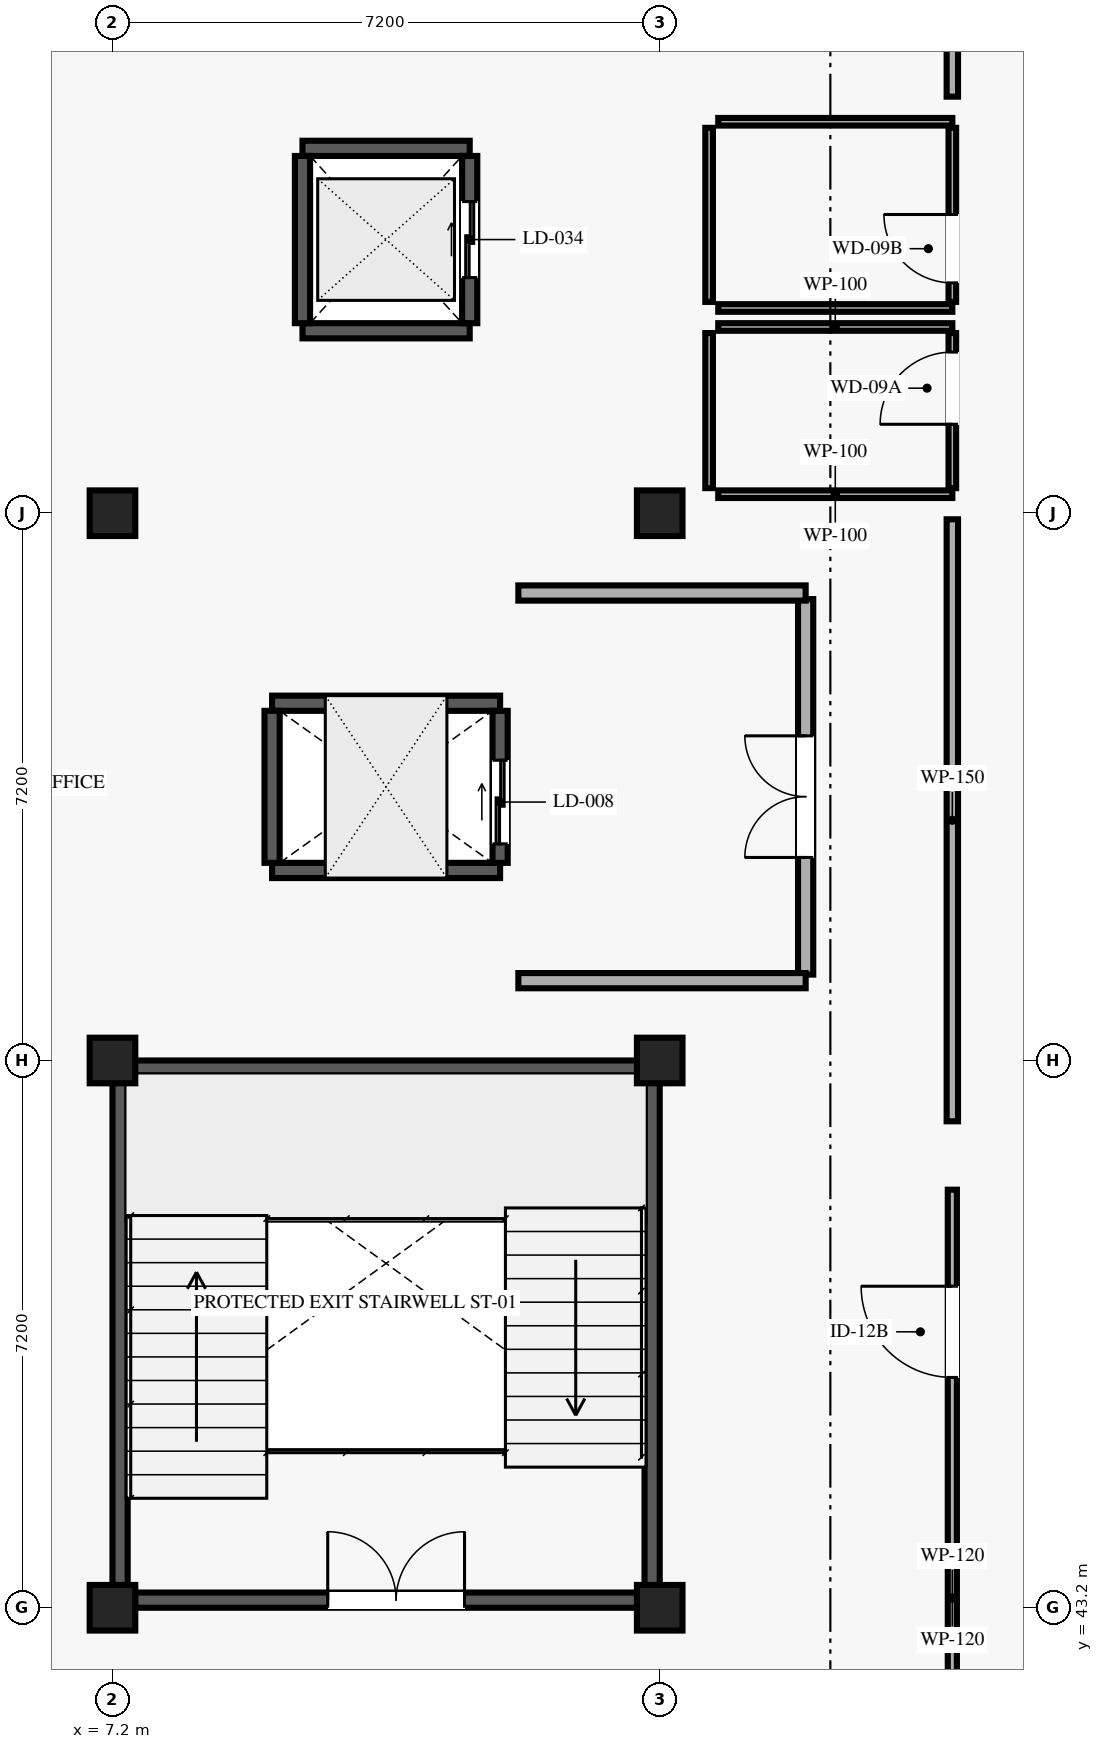
"""IFC4 building model, lengths in metres.
Left out: names, types, materials, properties, quantities, classifications, styles, units other than length and angle.
Written with IfcOpenShell. Run it as: python <this file> out.ifc"""

import sys

from ifc_helpers import new_model, si_unit, direction, frame, frame_2d, origin, origin_2d, place, context, subcontext, project, spatial, rectangle, extrude, element, fill, save


model = new_model("IFC4")
c1 = context("Model", 3, precision=1e-05, world=origin(), true_north=direction((0.0, 1.0)))
c2 = subcontext(c1, "Body", "Model", "MODEL_VIEW")
j1 = project(units=[si_unit("LENGTHUNIT", "METRE"), si_unit("PLANEANGLEUNIT", "RADIAN")], contexts=[c1])
p1 = place(None, origin())
s1 = spatial("IfcSite", under=j1, at=p1, CompositionType="ELEMENT")
p2 = place(p1, origin())
s2 = spatial("IfcBuilding", under=s1, at=p2, CompositionType="ELEMENT")
p3 = place(p2, frame((0.0, 0.0, 25.65)))
s3 = spatial("IfcBuildingStorey", under=s2, at=p3, CompositionType="ELEMENT", Elevation=25.65)
for number, where, z_axis, x_axis in (
    (1, (7.2, 43.2, 0.0), (0.0, 0.0, 1.0), (1.0, 0.0, 0.0)),
    (2, (7.2, 50.4, 0.0), (0.0, 0.0, 1.0), (1.0, 0.0, 0.0)),
    (3, (7.2, 57.6, 0.0), (0.0, 0.0, 1.0), (1.0, 0.0, 0.0)),
    (4, (14.4, 43.2, 0.0), (0.0, 0.0, 1.0), (1.0, 0.0, 0.0)),
    (5, (14.4, 50.4, 0.0), (0.0, 0.0, 1.0), (1.0, 0.0, 0.0)),
    (6, (14.4, 57.6, 0.0), (0.0, 0.0, 1.0), (1.0, 0.0, 0.0)),
):
    element("IfcColumn", number, at=place(p3, frame(where, z_axis=z_axis, x_axis=x_axis)), inside=s3, PredefinedType="COLUMN", context=c2, shape_type="SweptSolid", body=[
        extrude(rectangle(XDim=0.6, YDim=0.6, at=origin_2d()), origin(), (0.0, 0.0, 1.0), 4.05),
    ])
p4 = place(p3, frame((7.4, 43.3, 0.0), z_axis=(0.0, 0.0, 1.0), x_axis=(1.0, 0.0, 0.0)))
e7 = element("IfcWall", 7, at=p4, inside=s3, PredefinedType="SHEAR", context=c2, shape_type="SweptSolid", body=[
    extrude(rectangle(XDim=6.8, YDim=0.2, at=frame_2d((3.4, 0.0))), origin(), (0.0, 0.0, 1.0), 3.83),
])
p5 = place(p4, frame((2.632, 0.0, 0.0)))
e8 = element("IfcOpeningElement", 8, at=p5, cuts=e7, PredefinedType="OPENING", context=c2, shape_type="SweptSolid", body=[
    extrude(rectangle(XDim=1.8, YDim=2.2, at=frame_2d((0.9, 1.1))), frame((0.0, 0.11, 0.0), z_axis=(0.0, -1.0, 0.0), x_axis=(1.0, 0.0, 0.0)), (0.0, 0.0, 1.0), 0.22),
])
for number, where, z_axis, x_axis in (
    (9, (7.4, 50.3, 0.0), (0.0, 0.0, 1.0), (1.0, 0.0, 0.0)),
    (10, (7.3, 43.4, 0.0), (0.0, 0.0, 1.0), (0.0, 1.0, 0.0)),
    (11, (14.3, 43.4, 0.0), (0.0, 0.0, 1.0), (0.0, 1.0, 0.0)),
):
    element("IfcWall", number, at=place(p3, frame(where, z_axis=z_axis, x_axis=x_axis)), inside=s3, PredefinedType="SHEAR", context=c2, shape_type="SweptSolid", body=[
        extrude(rectangle(XDim=6.8, YDim=0.2, at=frame_2d((3.4, 0.0))), origin(), (0.0, 0.0, 1.0), 3.83),
    ])
for number, where, z_axis, x_axis in (
    (12, (9.3, 52.9, 0.0), (0.0, 0.0, 1.0), (1.0, 0.0, 0.0)),
    (13, (9.3, 55.1, 0.0), (0.0, 0.0, 1.0), (1.0, 0.0, 0.0)),
):
    element("IfcWall", number, at=place(p3, frame(where, z_axis=z_axis, x_axis=x_axis)), inside=s3, PredefinedType="SHEAR", context=c2, shape_type="SweptSolid", body=[
        extrude(rectangle(XDim=3.0, YDim=0.2, at=frame_2d((1.5, 0.0))), origin(), (0.0, 0.0, 1.0), 3.83),
    ])
p6 = place(p3, frame((9.3, 53.0, 0.0), z_axis=(0.0, 0.0, 1.0), x_axis=(0.0, 1.0, 0.0)))
e14 = element("IfcWall", 14, at=p6, inside=s3, PredefinedType="SHEAR", context=c2, shape_type="SweptSolid", body=[
    extrude(rectangle(XDim=2.0, YDim=0.2, at=frame_2d((1.0, 0.0))), origin(), (0.0, 0.0, 1.0), 3.83),
])
p7 = place(p3, frame((12.3, 53.0, 0.0), z_axis=(0.0, 0.0, 1.0), x_axis=(0.0, 1.0, 0.0)))
e15 = element("IfcWall", 15, at=p7, inside=s3, PredefinedType="SHEAR", context=c2, shape_type="SweptSolid", body=[
    extrude(rectangle(XDim=2.0, YDim=0.2, at=frame_2d((1.0, 0.0))), origin(), (0.0, 0.0, 1.0), 3.83),
])
p8 = place(p7, frame((0.25, 0.0, 0.0)))
e16 = element("IfcOpeningElement", 16, at=p8, cuts=e15, PredefinedType="OPENING", context=c2, shape_type="SweptSolid", body=[
    extrude(rectangle(XDim=1.1, YDim=2.15, at=frame_2d((0.55, 1.075))), frame((0.0, 0.11, 0.0), z_axis=(0.0, -1.0, 0.0), x_axis=(1.0, 0.0, 0.0)), (0.0, 0.0, 1.0), 0.22),
])
for number, where, z_axis, x_axis in (
    (17, (9.7, 60.0, 0.0), (0.0, 0.0, 1.0), (1.0, 0.0, 0.0)),
    (18, (9.7, 62.4, 0.0), (0.0, 0.0, 1.0), (1.0, 0.0, 0.0)),
    (19, (9.7, 60.1, 0.0), (0.0, 0.0, 1.0), (0.0, 1.0, 0.0)),
):
    element("IfcWall", number, at=place(p3, frame(where, z_axis=z_axis, x_axis=x_axis)), inside=s3, PredefinedType="SHEAR", context=c2, shape_type="SweptSolid", body=[
        extrude(rectangle(XDim=2.2, YDim=0.2, at=frame_2d((1.1, 0.0))), origin(), (0.0, 0.0, 1.0), 3.83),
    ])
p9 = place(p3, frame((11.9, 60.1, 0.0), z_axis=(0.0, 0.0, 1.0), x_axis=(0.0, 1.0, 0.0)))
e20 = element("IfcWall", 20, at=p9, inside=s3, PredefinedType="SHEAR", context=c2, shape_type="SweptSolid", body=[
    extrude(rectangle(XDim=2.2, YDim=0.2, at=frame_2d((1.1, 0.0))), origin(), (0.0, 0.0, 1.0), 3.83),
])
p10 = place(p9, frame((0.6, 0.0, 0.0)))
e21 = element("IfcOpeningElement", 21, at=p10, cuts=e20, PredefinedType="OPENING", context=c2, shape_type="SweptSolid", body=[
    extrude(rectangle(XDim=1.0, YDim=2.1, at=frame_2d((0.5, 1.05))), frame((0.0, 0.11, 0.0), z_axis=(0.0, -1.0, 0.0), x_axis=(1.0, 0.0, 0.0)), (0.0, 0.0, 1.0), 0.22),
])
p11 = place(p3, frame((16.32, 51.53, 0.0), z_axis=(0.0, 0.0, 1.0), x_axis=(0.0, 1.0, 0.0)))
e22 = element("IfcWall", 22, at=p11, inside=s3, PredefinedType="SOLIDWALL", context=c2, shape_type="SweptSolid", body=[
    extrude(rectangle(XDim=4.94, YDim=0.2, at=frame_2d((2.47, 0.0))), origin(), (0.0, 0.0, 1.0), 3.83),
])
p12 = place(p11, frame((1.541, 0.0, 0.0)))
e23 = element("IfcOpeningElement", 23, at=p12, cuts=e22, PredefinedType="OPENING", context=c2, shape_type="SweptSolid", body=[
    extrude(rectangle(XDim=1.6, YDim=2.2, at=frame_2d((0.8, 1.1))), frame((0.0, 0.11, 0.0), z_axis=(0.0, -1.0, 0.0), x_axis=(1.0, 0.0, 0.0)), (0.0, 0.0, 1.0), 0.22),
])
for number, where, z_axis, x_axis in (
    (24, (12.54, 51.45, 0.0), (0.0, 0.0, 1.0), (1.0, 0.0, 0.0)),
    (25, (12.54, 56.55, 0.0), (0.0, 0.0, 1.0), (1.0, 0.0, 0.0)),
):
    element("IfcWall", number, at=place(p3, frame(where, z_axis=z_axis, x_axis=x_axis)), inside=s3, PredefinedType="SOLIDWALL", context=c2, shape_type="SweptSolid", body=[
        extrude(rectangle(XDim=3.78, YDim=0.2, at=frame_2d((1.89, 0.0))), origin(), (0.0, 0.0, 1.0), 3.83),
    ])
p13 = place(p3, frame((18.25, 57.93, 0.0), z_axis=(0.0, 0.0, 1.0), x_axis=(0.0, 1.0, 0.0)))
e26 = element("IfcWall", 26, at=p13, inside=s3, PredefinedType="PARTITIONING", context=c2, shape_type="SweptSolid", body=[
    extrude(rectangle(XDim=2.04, YDim=0.1, at=frame_2d((1.02, 0.0))), origin(), (0.0, 0.0, 1.0), 3.83),
])
p14 = place(p13, frame((0.84, 0.0, 0.0)))
e27 = element("IfcOpeningElement", 27, at=p14, cuts=e26, PredefinedType="OPENING", context=c2, shape_type="SweptSolid", body=[
    extrude(rectangle(XDim=0.95, YDim=2.1, at=frame_2d((0.475, 1.05))), frame((0.0, 0.06, 0.0), z_axis=(0.0, -1.0, 0.0), x_axis=(1.0, 0.0, 0.0)), (0.0, 0.0, 1.0), 0.12),
])
p15 = place(p3, frame((15.17, 57.85, 0.0), z_axis=(0.0, 0.0, 1.0), x_axis=(1.0, 0.0, 0.0)))
e28 = element("IfcWall", 28, at=p15, inside=s3, PredefinedType="PARTITIONING", context=c2, shape_type="SweptSolid", body=[
    extrude(rectangle(XDim=3.08, YDim=0.1, at=frame_2d((1.54, 0.0))), origin(), (0.0, 0.0, 1.0), 3.32),
])
p16 = place(p3, frame((15.17, 60.05, 0.0), z_axis=(0.0, 0.0, 1.0), x_axis=(1.0, 0.0, 0.0)))
e29 = element("IfcWall", 29, at=p16, inside=s3, PredefinedType="PARTITIONING", context=c2, shape_type="SweptSolid", body=[
    extrude(rectangle(XDim=3.08, YDim=0.1, at=frame_2d((1.54, 0.0))), origin(), (0.0, 0.0, 1.0), 3.83),
])
p17 = place(p3, frame((15.05, 57.93, 0.0), z_axis=(0.0, 0.0, 1.0), x_axis=(0.0, 1.0, 0.0)))
e30 = element("IfcWall", 30, at=p17, inside=s3, PredefinedType="PARTITIONING", context=c2, shape_type="SweptSolid", body=[
    extrude(rectangle(XDim=2.04, YDim=0.1, at=frame_2d((1.02, 0.0))), origin(), (0.0, 0.0, 1.0), 3.83),
])
p18 = place(p3, frame((18.25, 60.38, 0.0), z_axis=(0.0, 0.0, 1.0), x_axis=(0.0, 1.0, 0.0)))
e31 = element("IfcWall", 31, at=p18, inside=s3, PredefinedType="PARTITIONING", context=c2, shape_type="SweptSolid", body=[
    extrude(rectangle(XDim=2.29, YDim=0.1, at=frame_2d((1.145, 0.0))), origin(), (0.0, 0.0, 1.0), 3.83),
])
p19 = place(p18, frame((0.25, 0.0, 0.0)))
e32 = element("IfcOpeningElement", 32, at=p19, cuts=e31, PredefinedType="OPENING", context=c2, shape_type="SweptSolid", body=[
    extrude(rectangle(XDim=0.9, YDim=2.1, at=frame_2d((0.45, 1.05))), frame((0.0, 0.06, 0.0), z_axis=(0.0, -1.0, 0.0), x_axis=(1.0, 0.0, 0.0)), (0.0, 0.0, 1.0), 0.12),
])
for number, where, z_axis, x_axis in (
    (33, (15.17, 60.3, 0.0), (0.0, 0.0, 1.0), (1.0, 0.0, 0.0)),
    (34, (15.17, 62.75, 0.0), (0.0, 0.0, 1.0), (1.0, 0.0, 0.0)),
):
    element("IfcWall", number, at=place(p3, frame(where, z_axis=z_axis, x_axis=x_axis)), inside=s3, PredefinedType="PARTITIONING", context=c2, shape_type="SweptSolid", body=[
        extrude(rectangle(XDim=3.08, YDim=0.1, at=frame_2d((1.54, 0.0))), origin(), (0.0, 0.0, 1.0), 3.83),
    ])
p20 = place(p3, frame((15.05, 60.38, 0.0), z_axis=(0.0, 0.0, 1.0), x_axis=(0.0, 1.0, 0.0)))
e35 = element("IfcWall", 35, at=p20, inside=s3, PredefinedType="PARTITIONING", context=c2, shape_type="SweptSolid", body=[
    extrude(rectangle(XDim=2.29, YDim=0.1, at=frame_2d((1.145, 0.0))), origin(), (0.0, 0.0, 1.0), 3.83),
])
p21 = place(p3, frame((18.25, 36.55, 0.0), z_axis=(0.0, 0.0, 1.0), x_axis=(0.0, 1.0, 0.0)))
e36 = element("IfcWall", 36, at=p21, inside=s3, PredefinedType="PARTITIONING", context=c2, shape_type="SweptSolid", body=[
    extrude(rectangle(XDim=12.15, YDim=0.12, at=frame_2d((6.075, 0.0))), origin(), (0.0, 0.0, 1.0), 3.83),
])
p22 = place(p21, frame((9.68, 0.0, 0.0)))
e37 = element("IfcOpeningElement", 37, at=p22, cuts=e36, PredefinedType="OPENING", context=c2, shape_type="SweptSolid", body=[
    extrude(rectangle(XDim=1.2, YDim=2.15, at=frame_2d((0.6, 1.075))), frame((0.0, 0.07, 0.0), z_axis=(0.0, -1.0, 0.0), x_axis=(1.0, 0.0, 0.0)), (0.0, 0.0, 1.0), 0.14),
])
p23 = place(p3, frame((18.25, 63.08, 0.0), z_axis=(0.0, 0.0, 1.0), x_axis=(0.0, 1.0, 0.0)))
e38 = element("IfcWall", 38, at=p23, inside=s3, PredefinedType="PARTITIONING", context=c2, shape_type="SweptSolid", body=[
    extrude(rectangle(XDim=8.62, YDim=0.15, at=frame_2d((4.31, 0.0))), origin(), (0.0, 0.0, 1.0), 3.83),
])
p24 = place(p23, frame((4.795, 0.0, 0.0)))
e39 = element("IfcOpeningElement", 39, at=p24, cuts=e38, PredefinedType="OPENING", context=c2, shape_type="SweptSolid", body=[
    extrude(rectangle(XDim=1.05, YDim=2.15, at=frame_2d((0.525, 1.075))), frame((0.0, 0.085, 0.0), z_axis=(0.0, -1.0, 0.0), x_axis=(1.0, 0.0, 0.0)), (0.0, 0.0, 1.0), 0.17),
])
p25 = place(p3, frame((18.25, 49.6, 0.0), z_axis=(0.0, 0.0, 1.0), x_axis=(0.0, 1.0, 0.0)))
e40 = element("IfcWall", 40, at=p25, inside=s3, PredefinedType="PARTITIONING", context=c2, shape_type="SweptSolid", body=[
    extrude(rectangle(XDim=7.92, YDim=0.15, at=frame_2d((3.96, 0.0))), origin(), (0.0, 0.0, 1.0), 3.83),
])
p26 = place(p5, origin())
e41 = element("IfcDoor", 41, at=p26, inside=s3, OperationType="DOUBLE_DOOR_SINGLE_SWING", PredefinedType="DOOR", context=c2, shape_type="SweptSolid", body=[
    extrude(rectangle(XDim=1.8, YDim=2.2, at=frame_2d((0.9, 1.1))), frame((0.0, 0.025, 0.0), z_axis=(0.0, -1.0, 0.0), x_axis=(1.0, 0.0, 0.0)), (0.0, 0.0, 1.0), 0.05),
])
fill(e8, e41)
p27 = place(p8, origin())
e42 = element("IfcDoor", 42, at=p27, inside=s3, OperationType="DOUBLE_DOOR_SLIDING", PredefinedType="DOOR", context=c2, shape_type="SweptSolid", body=[
    extrude(rectangle(XDim=1.1, YDim=2.15, at=frame_2d((0.55, 1.075))), frame((0.0, 0.025, 0.0), z_axis=(0.0, -1.0, 0.0), x_axis=(1.0, 0.0, 0.0)), (0.0, 0.0, 1.0), 0.05),
])
fill(e16, e42)
p28 = place(p10, origin())
e43 = element("IfcDoor", 43, at=p28, inside=s3, OperationType="DOUBLE_DOOR_SLIDING", PredefinedType="DOOR", context=c2, shape_type="SweptSolid", body=[
    extrude(rectangle(XDim=1.0, YDim=2.1, at=frame_2d((0.5, 1.05))), frame((0.0, 0.025, 0.0), z_axis=(0.0, -1.0, 0.0), x_axis=(1.0, 0.0, 0.0)), (0.0, 0.0, 1.0), 0.05),
])
fill(e21, e43)
p29 = place(p12, origin())
e44 = element("IfcDoor", 44, at=p29, inside=s3, OperationType="DOUBLE_DOOR_SINGLE_SWING", PredefinedType="DOOR", context=c2, shape_type="SweptSolid", body=[
    extrude(rectangle(XDim=1.6, YDim=2.2, at=frame_2d((0.8, 1.1))), frame((0.0, 0.025, 0.0), z_axis=(0.0, -1.0, 0.0), x_axis=(1.0, 0.0, 0.0)), (0.0, 0.0, 1.0), 0.05),
])
fill(e23, e44)
p30 = place(p14, origin())
e45 = element("IfcDoor", 45, at=p30, inside=s3, OperationType="SINGLE_SWING_LEFT", PredefinedType="DOOR", context=c2, shape_type="SweptSolid", body=[
    extrude(rectangle(XDim=0.95, YDim=2.1, at=frame_2d((0.475, 1.05))), frame((0.0, 0.025, 0.0), z_axis=(0.0, -1.0, 0.0), x_axis=(1.0, 0.0, 0.0)), (0.0, 0.0, 1.0), 0.05),
])
fill(e27, e45)
p31 = place(p19, origin())
e46 = element("IfcDoor", 46, at=p31, inside=s3, OperationType="SINGLE_SWING_RIGHT", PredefinedType="DOOR", context=c2, shape_type="SweptSolid", body=[
    extrude(rectangle(XDim=0.9, YDim=2.1, at=frame_2d((0.45, 1.05))), frame((0.0, 0.025, 0.0), z_axis=(0.0, -1.0, 0.0), x_axis=(1.0, 0.0, 0.0)), (0.0, 0.0, 1.0), 0.05),
])
fill(e32, e46)
p32 = place(p22, origin())
e47 = element("IfcDoor", 47, at=p32, inside=s3, OperationType="SINGLE_SWING_RIGHT", PredefinedType="DOOR", context=c2, shape_type="SweptSolid", body=[
    extrude(rectangle(XDim=1.2, YDim=2.15, at=frame_2d((0.6, 1.075))), frame((0.0, 0.025, 0.0), z_axis=(0.0, -1.0, 0.0), x_axis=(1.0, 0.0, 0.0)), (0.0, 0.0, 1.0), 0.05),
])
fill(e37, e47)
save(model, sys.argv[1])
